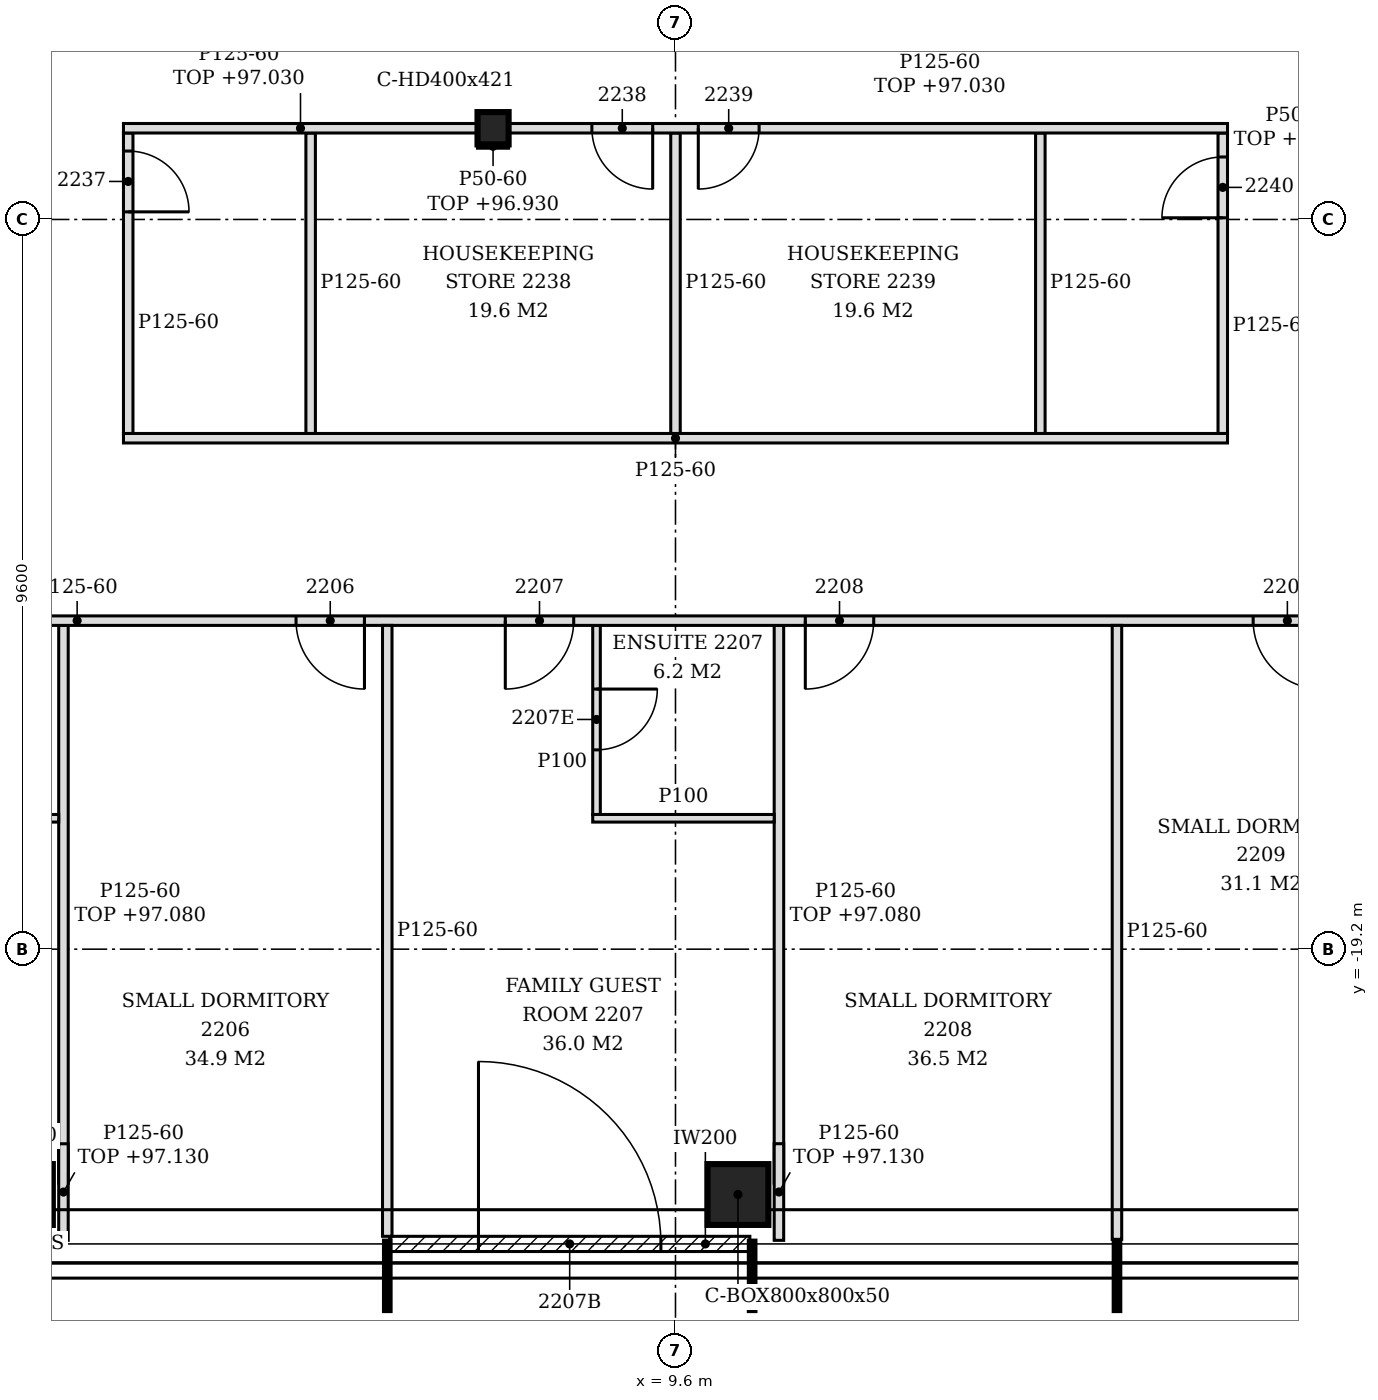
"""IFC4 building model, lengths in metres.
Left out: names, types, materials, properties, quantities, classifications, styles, units other than length and angle.
Written with IfcOpenShell. Run it as: python <this file> out.ifc"""

import sys

from ifc_helpers import new_model, si_unit, direction, frame, frame_2d, origin, origin_2d, place, context, subcontext, project, spatial, polyline, rectangle, hollow_rectangle, i_section, outline, extrude, clip, halfspace, element, fill, save


model = new_model("IFC4")
c1 = context("Model", 3, precision=1e-05, world=origin(), true_north=direction((0.0, 1.0)))
c2 = subcontext(c1, "Body", "Model", "MODEL_VIEW")
j1 = project(units=[si_unit("LENGTHUNIT", "METRE"), si_unit("PLANEANGLEUNIT", "RADIAN")], contexts=[c1])
p1 = place(None, origin())
s1 = spatial("IfcSite", under=j1, at=p1, CompositionType="ELEMENT")
p2 = place(p1, origin())
s2 = spatial("IfcBuilding", under=s1, at=p2, CompositionType="ELEMENT")
p3 = place(p2, frame((0.0, 0.0, 94.2)))
s3 = spatial("IfcBuildingStorey", under=s2, at=p3, CompositionType="ELEMENT", Elevation=94.2)
for number, where, z_axis, x_axis in (
    (1, (1.008, -22.428, -0.15), (0.282, 0.188, 0.941), (-0.555, 0.832, 0.0)),
    (2, (10.422, -22.428, -0.15), (0.282, 0.188, 0.941), (-0.555, 0.832, 0.0)),
):
    element("IfcColumn", number, at=place(p3, frame(where, z_axis=z_axis, x_axis=x_axis)), inside=s3, PredefinedType="COLUMN", context=c2, shape_type="Clipping", body=[
        clip(clip(extrude(hollow_rectangle(XDim=0.8, YDim=0.8, WallThickness=0.05, at=origin_2d()), origin(), (0.0, 0.0, 1.0), 3.826), halfspace(frame((0.0, 0.0, 0.024), z_axis=(0.0, 0.0, 1.0), x_axis=(1.0, 0.0, 0.0)), True)), halfspace(frame((0.0, 0.0, 3.802), z_axis=(0.0, 0.0, 1.0), x_axis=(1.0, 0.0, 0.0)), False)),
    ])
p4 = place(p3, frame((7.2, -8.4, -0.15), z_axis=(0.0, 0.0, 1.0), x_axis=(1.0, 0.0, 0.0)))
e3 = element("IfcColumn", 3, at=p4, inside=s3, PredefinedType="COLUMN", context=c2, shape_type="SweptSolid", body=[
    extrude(i_section(OverallWidth=0.409, OverallDepth=0.425, WebThickness=0.033, FlangeThickness=0.052, FilletRadius=0.015, at=origin_2d()), origin(), (0.0, 0.0, 1.0), 3.6),
])
p5 = place(p3, frame((5.838, -23.078, 0.0), z_axis=(0.0, 0.0, 1.0), x_axis=(1.0, 0.0, 0.0)))
e4 = element("IfcWall", 4, at=p5, inside=s3, PredefinedType="NOTDEFINED", context=c2, shape_type="SweptSolid", body=[
    extrude(rectangle(XDim=4.74, YDim=0.2, at=frame_2d((2.37, 0.0))), origin(), (0.0, 0.0, 1.0), 3.45),
])
p6 = place(p5, frame((1.17, 0.0, 0.0)))
e5 = element("IfcOpeningElement", 5, at=p6, cuts=e4, PredefinedType="OPENING", context=c2, shape_type="SweptSolid", body=[
    extrude(rectangle(XDim=2.4, YDim=2.4, at=frame_2d((1.2, 1.2))), frame((0.0, 0.11, 0.0), z_axis=(0.0, -1.0, 0.0), x_axis=(1.0, 0.0, 0.0)), (0.0, 0.0, 1.0), 0.22),
])
p7 = place(p3, frame((1.548, -23.031, 0.0), z_axis=(0.0, 0.0, 1.0), x_axis=(0.0, 1.0, 0.0)))
e6 = element("IfcWall", 6, at=p7, inside=s3, PredefinedType="PARTITIONING", context=c2, shape_type="SweptSolid", body=[
    extrude(outline(polyline([(0.0, 0.0), (0.44, 0.0), (0.44, 0.863), (0.44, 1.725), (0.711, 2.588), (0.933, 2.93), (0.0, 2.93), (0.0, 2.588), (0.0, 1.725), (0.0, 0.863), (0.0, 0.0)])), frame((0.0, 0.062, 0.0), z_axis=(0.0, -1.0, 0.0), x_axis=(1.0, 0.0, 0.0)), (0.0, 0.0, 1.0), 0.125),
])
p8 = place(p3, frame((5.808, -22.978, 0.0), z_axis=(0.0, 0.0, 1.0), x_axis=(0.0, 1.0, 0.0)))
e7 = element("IfcWall", 7, at=p8, inside=s3, PredefinedType="PARTITIONING", context=c2, shape_type="SweptSolid", body=[
    extrude(outline(polyline([(0.0, 0.0), (8.037, 0.0), (8.037, 3.45), (5.274, 3.45), (5.272, 2.88), (5.064, 2.88), (5.062, 3.45), (1.419, 3.45), (1.417, 2.93), (1.119, 2.93), (1.117, 3.45), (0.0, 3.45), (0.0, 0.0)])), frame((0.0, 0.062, 0.0), z_axis=(0.0, -1.0, 0.0), x_axis=(1.0, 0.0, 0.0)), (0.0, 0.0, 1.0), 0.125),
])
p9 = place(p3, frame((10.961, -23.031, 0.0), z_axis=(0.0, 0.0, 1.0), x_axis=(0.0, 1.0, 0.0)))
e8 = element("IfcWall", 8, at=p9, inside=s3, PredefinedType="PARTITIONING", context=c2, shape_type="SweptSolid", body=[
    extrude(outline(polyline([(0.0, 0.0), (0.44, 0.0), (0.44, 0.863), (0.44, 1.725), (0.711, 2.588), (0.934, 2.93), (0.0, 2.93), (0.0, 2.588), (0.0, 1.725), (0.0, 0.863), (0.0, 0.0)])), frame((0.0, 0.062, 0.0), z_axis=(0.0, -1.0, 0.0), x_axis=(1.0, 0.0, 0.0)), (0.0, 0.0, 1.0), 0.125),
])
p10 = place(p3, frame((15.408, -23.018, 0.0), z_axis=(0.0, 0.0, 1.0), x_axis=(0.0, 1.0, 0.0)))
e9 = element("IfcWall", 9, at=p10, inside=s3, PredefinedType="PARTITIONING", context=c2, shape_type="SweptSolid", body=[
    extrude(outline(polyline([(0.0, 0.0), (8.077, 0.0), (8.077, 3.45), (5.314, 3.45), (5.312, 2.88), (5.104, 2.88), (5.102, 3.45), (1.459, 3.45), (1.457, 2.93), (1.159, 2.93), (1.157, 3.45), (0.0, 3.45), (0.0, 0.0)])), frame((0.0, 0.062, 0.0), z_axis=(0.0, -1.0, 0.0), x_axis=(1.0, 0.0, 0.0)), (0.0, 0.0, 1.0), 0.125),
])
p11 = place(p3, frame((1.548, -22.28, 0.0), z_axis=(0.0, 0.0, 1.0), x_axis=(0.0, 1.0, 0.0)))
e10 = element("IfcWall", 10, at=p11, inside=s3, PredefinedType="PARTITIONING", context=c2, shape_type="SweptSolid", body=[
    extrude(outline(polyline([(0.0, 0.0), (7.339, 0.0), (7.339, 0.863), (7.339, 1.725), (7.339, 2.588), (7.339, 2.88), (0.734, 2.88), (0.734, 2.588), (0.734, 1.725), (0.56, 0.863), (0.0, 0.0)])), frame((0.0, 0.062, 0.0), z_axis=(0.0, -1.0, 0.0), x_axis=(1.0, 0.0, 0.0)), (0.0, 0.0, 1.0), 0.125),
])
p12 = place(p3, frame((10.961, -22.279, 0.0), z_axis=(0.0, 0.0, 1.0), x_axis=(0.0, 1.0, 0.0)))
e11 = element("IfcWall", 11, at=p12, inside=s3, PredefinedType="PARTITIONING", context=c2, shape_type="SweptSolid", body=[
    extrude(outline(polyline([(0.0, 0.0), (7.338, 0.0), (7.338, 0.863), (7.338, 1.725), (7.338, 2.588), (7.338, 2.88), (0.733, 2.88), (0.733, 2.588), (0.733, 1.725), (0.56, 0.863), (0.0, 0.0)])), frame((0.0, 0.062, 0.0), z_axis=(0.0, -1.0, 0.0), x_axis=(1.0, 0.0, 0.0)), (0.0, 0.0, 1.0), 0.125),
])
p13 = place(p3, frame((-0.902, -17.478, 0.0), z_axis=(0.0, 0.0, 1.0), x_axis=(1.0, 0.0, 0.0)))
e12 = element("IfcWall", 12, at=p13, inside=s3, PredefinedType="PARTITIONING", context=c2, shape_type="SweptSolid", body=[
    extrude(rectangle(XDim=2.388, YDim=0.1, at=frame_2d((1.194, 0.0))), origin(), (0.0, 0.0, 1.0), 3.45),
])
p14 = place(p3, frame((8.511, -17.478, 0.0), z_axis=(0.0, 0.0, 1.0), x_axis=(1.0, 0.0, 0.0)))
e13 = element("IfcWall", 13, at=p14, inside=s3, PredefinedType="PARTITIONING", context=c2, shape_type="SweptSolid", body=[
    extrude(rectangle(XDim=2.387, YDim=0.1, at=frame_2d((1.194, 0.0))), origin(), (0.0, 0.0, 1.0), 3.45),
])
p15 = place(p3, frame((8.561, -17.428, 0.0), z_axis=(0.0, 0.0, 1.0), x_axis=(0.0, 1.0, 0.0)))
e14 = element("IfcWall", 14, at=p15, inside=s3, PredefinedType="PARTITIONING", context=c2, shape_type="SweptSolid", body=[
    extrude(rectangle(XDim=2.488, YDim=0.1, at=frame_2d((1.244, 0.0))), origin(), (0.0, 0.0, 1.0), 3.45),
])
p16 = place(p15, frame((0.85, 0.0, 0.0)))
e15 = element("IfcOpeningElement", 15, at=p16, cuts=e14, PredefinedType="OPENING", context=c2, shape_type="SweptSolid", body=[
    extrude(rectangle(XDim=0.8, YDim=2.1, at=frame_2d((0.4, 1.05))), frame((0.0, 0.06, 0.0), z_axis=(0.0, -1.0, 0.0), x_axis=(1.0, 0.0, 0.0)), (0.0, 0.0, 1.0), 0.12),
])
p17 = place(p3, frame((-19.342, -14.878, 0.0), z_axis=(0.0, 0.0, 1.0), x_axis=(1.0, 0.0, 0.0)))
e16 = element("IfcWall", 16, at=p17, inside=s3, PredefinedType="PARTITIONING", context=c2, shape_type="SweptSolid", body=[
    extrude(outline(polyline([(0.0, 0.0), (38.479, 0.0), (38.479, 2.73), (38.392, 2.73), (38.39, 3.45), (26.692, 3.45), (26.69, 2.73), (26.392, 2.73), (26.39, 3.45), (14.692, 3.45), (14.69, 2.73), (14.392, 2.73), (14.39, 3.45), (5.092, 3.45), (5.09, 2.93), (4.792, 2.93), (4.79, 3.45), (0.0, 3.45), (0.0, 0.0)])), frame((0.0, 0.062, 0.0), z_axis=(0.0, -1.0, 0.0), x_axis=(1.0, 0.0, 0.0)), (0.0, 0.0, 1.0), 0.125),
])
p18 = place(p17, frame((0.863, 0.0, 0.0)))
e17 = element("IfcOpeningElement", 17, at=p18, cuts=e16, PredefinedType="OPENING", context=c2, shape_type="SweptSolid", body=[
    extrude(rectangle(XDim=0.9, YDim=2.1, at=frame_2d((0.45, 1.05))), frame((0.0, 0.073, 0.0), z_axis=(0.0, -1.0, 0.0), x_axis=(1.0, 0.0, 0.0)), (0.0, 0.0, 1.0), 0.145),
])
p19 = place(p17, frame((3.742, 0.0, 0.0)))
e18 = element("IfcOpeningElement", 18, at=p19, cuts=e16, PredefinedType="OPENING", context=c2, shape_type="SweptSolid", body=[
    extrude(rectangle(XDim=0.9, YDim=2.1, at=frame_2d((0.45, 1.05))), frame((0.0, 0.073, 0.0), z_axis=(0.0, -1.0, 0.0), x_axis=(1.0, 0.0, 0.0)), (0.0, 0.0, 1.0), 0.145),
])
p20 = place(p17, frame((7.876, 0.0, 0.0)))
e19 = element("IfcOpeningElement", 19, at=p20, cuts=e16, PredefinedType="OPENING", context=c2, shape_type="SweptSolid", body=[
    extrude(rectangle(XDim=0.9, YDim=2.1, at=frame_2d((0.45, 1.05))), frame((0.0, 0.073, 0.0), z_axis=(0.0, -1.0, 0.0), x_axis=(1.0, 0.0, 0.0)), (0.0, 0.0, 1.0), 0.145),
])
p21 = place(p17, frame((14.35, 0.0, 0.0)))
e20 = element("IfcOpeningElement", 20, at=p21, cuts=e16, PredefinedType="OPENING", context=c2, shape_type="SweptSolid", body=[
    extrude(rectangle(XDim=0.9, YDim=2.1, at=frame_2d((0.45, 1.05))), frame((0.0, 0.073, 0.0), z_axis=(0.0, -1.0, 0.0), x_axis=(1.0, 0.0, 0.0)), (0.0, 0.0, 1.0), 0.145),
])
p22 = place(p17, frame((17.29, 0.0, 0.0)))
e21 = element("IfcOpeningElement", 21, at=p22, cuts=e16, PredefinedType="OPENING", context=c2, shape_type="SweptSolid", body=[
    extrude(rectangle(XDim=0.9, YDim=2.1, at=frame_2d((0.45, 1.05))), frame((0.0, 0.073, 0.0), z_axis=(0.0, -1.0, 0.0), x_axis=(1.0, 0.0, 0.0)), (0.0, 0.0, 1.0), 0.145),
])
p23 = place(p17, frame((23.95, 0.0, 0.0)))
e22 = element("IfcOpeningElement", 22, at=p23, cuts=e16, PredefinedType="OPENING", context=c2, shape_type="SweptSolid", body=[
    extrude(rectangle(XDim=0.9, YDim=2.1, at=frame_2d((0.45, 1.05))), frame((0.0, 0.073, 0.0), z_axis=(0.0, -1.0, 0.0), x_axis=(1.0, 0.0, 0.0)), (0.0, 0.0, 1.0), 0.145),
])
p24 = place(p17, frame((26.703, 0.0, 0.0)))
e23 = element("IfcOpeningElement", 23, at=p24, cuts=e16, PredefinedType="OPENING", context=c2, shape_type="SweptSolid", body=[
    extrude(rectangle(XDim=0.9, YDim=2.1, at=frame_2d((0.45, 1.05))), frame((0.0, 0.073, 0.0), z_axis=(0.0, -1.0, 0.0), x_axis=(1.0, 0.0, 0.0)), (0.0, 0.0, 1.0), 0.145),
])
p25 = place(p17, frame((30.65, 0.0, 0.0)))
e24 = element("IfcOpeningElement", 24, at=p25, cuts=e16, PredefinedType="OPENING", context=c2, shape_type="SweptSolid", body=[
    extrude(rectangle(XDim=0.9, YDim=2.1, at=frame_2d((0.45, 1.05))), frame((0.0, 0.073, 0.0), z_axis=(0.0, -1.0, 0.0), x_axis=(1.0, 0.0, 0.0)), (0.0, 0.0, 1.0), 0.145),
])
p26 = place(p17, frame((36.542, 0.0, 0.0)))
e25 = element("IfcOpeningElement", 25, at=p26, cuts=e16, PredefinedType="OPENING", context=c2, shape_type="SweptSolid", body=[
    extrude(rectangle(XDim=0.9, YDim=2.1, at=frame_2d((0.45, 1.05))), frame((0.0, 0.073, 0.0), z_axis=(0.0, -1.0, 0.0), x_axis=(1.0, 0.0, 0.0)), (0.0, 0.0, 1.0), 0.145),
])
p27 = place(p3, frame((2.337, -12.478, 0.0), z_axis=(0.0, 0.0, 1.0), x_axis=(1.0, 0.0, 0.0)))
e26 = element("IfcWall", 26, at=p27, inside=s3, PredefinedType="PARTITIONING", context=c2, shape_type="SweptSolid", body=[
    extrude(outline(polyline([(0.0, 0.0), (14.525, 0.0), (14.525, 3.45), (5.012, 3.45), (5.01, 2.73), (4.712, 2.73), (4.71, 3.45), (0.0, 3.45), (0.0, 0.0)])), frame((0.0, 0.062, 0.0), z_axis=(0.0, -1.0, 0.0), x_axis=(1.0, 0.0, 0.0)), (0.0, 0.0, 1.0), 0.125),
])
p28 = place(p3, frame((2.4, -12.416, 0.0), z_axis=(0.0, 0.0, 1.0), x_axis=(0.0, 1.0, 0.0)))
e27 = element("IfcWall", 27, at=p28, inside=s3, PredefinedType="PARTITIONING", context=c2, shape_type="SweptSolid", body=[
    extrude(outline(polyline([(0.0, 0.0), (3.953, 0.0), (3.953, 2.83), (3.865, 2.83), (3.864, 3.45), (0.0, 3.45), (0.0, 0.0)])), frame((0.0, 0.062, 0.0), z_axis=(0.0, -1.0, 0.0), x_axis=(1.0, 0.0, 0.0)), (0.0, 0.0, 1.0), 0.125),
])
p29 = place(p28, frame((2.916, 0.0, 0.0)))
e28 = element("IfcOpeningElement", 28, at=p29, cuts=e27, PredefinedType="OPENING", context=c2, shape_type="SweptSolid", body=[
    extrude(rectangle(XDim=0.8, YDim=2.1, at=frame_2d((0.4, 1.05))), frame((0.0, 0.073, 0.0), z_axis=(0.0, -1.0, 0.0), x_axis=(1.0, 0.0, 0.0)), (0.0, 0.0, 1.0), 0.145),
])
for number, where, z_axis, x_axis in (
    (29, (4.8, -12.416, 0.0), (0.0, 0.0, 1.0), (0.0, 1.0, 0.0)),
    (30, (9.6, -12.416, 0.0), (0.0, 0.0, 1.0), (0.0, 1.0, 0.0)),
    (31, (14.4, -12.416, 0.0), (0.0, 0.0, 1.0), (0.0, 1.0, 0.0)),
):
    element("IfcWall", number, at=place(p3, frame(where, z_axis=z_axis, x_axis=x_axis)), inside=s3, PredefinedType="PARTITIONING", context=c2, shape_type="SweptSolid", body=[
        extrude(outline(polyline([(0.0, 0.0), (3.953, 0.0), (3.953, 2.83), (3.865, 2.83), (3.864, 3.45), (0.0, 3.45), (0.0, 0.0)])), frame((0.0, 0.062, 0.0), z_axis=(0.0, -1.0, 0.0), x_axis=(1.0, 0.0, 0.0)), (0.0, 0.0, 1.0), 0.125),
    ])
p30 = place(p3, frame((16.8, -12.416, 0.0), z_axis=(0.0, 0.0, 1.0), x_axis=(0.0, 1.0, 0.0)))
e32 = element("IfcWall", 32, at=p30, inside=s3, PredefinedType="PARTITIONING", context=c2, shape_type="SweptSolid", body=[
    extrude(outline(polyline([(0.0, 0.0), (3.953, 0.0), (3.953, 2.83), (3.865, 2.83), (3.864, 3.45), (0.0, 3.45), (0.0, 0.0)])), frame((0.0, 0.062, 0.0), z_axis=(0.0, -1.0, 0.0), x_axis=(1.0, 0.0, 0.0)), (0.0, 0.0, 1.0), 0.125),
])
p31 = place(p30, frame((2.837, 0.0, 0.0)))
e33 = element("IfcOpeningElement", 33, at=p31, cuts=e32, PredefinedType="OPENING", context=c2, shape_type="SweptSolid", body=[
    extrude(rectangle(XDim=0.8, YDim=2.1, at=frame_2d((0.4, 1.05))), frame((0.0, 0.073, 0.0), z_axis=(0.0, -1.0, 0.0), x_axis=(1.0, 0.0, 0.0)), (0.0, 0.0, 1.0), 0.145),
])
p32 = place(p3, frame((2.337, -8.4, 0.0), z_axis=(0.0, 0.0, 1.0), x_axis=(1.0, 0.0, 0.0)))
e34 = element("IfcWall", 34, at=p32, inside=s3, PredefinedType="PARTITIONING", context=c2, shape_type="SweptSolid", body=[
    extrude(rectangle(XDim=4.658, YDim=0.125, at=frame_2d((2.329, 0.0))), origin(), (0.0, 0.0, 1.0), 2.83),
])
p33 = place(p3, frame((7.405, -8.4, 0.0), z_axis=(0.0, 0.0, 1.0), x_axis=(1.0, 0.0, 0.0)))
e35 = element("IfcWall", 35, at=p33, inside=s3, PredefinedType="PARTITIONING", context=c2, shape_type="SweptSolid", body=[
    extrude(rectangle(XDim=9.458, YDim=0.125, at=frame_2d((4.729, 0.0))), origin(), (0.0, 0.0, 1.0), 2.83),
])
p34 = place(p33, frame((1.095, 0.0, 0.0)))
e36 = element("IfcOpeningElement", 36, at=p34, cuts=e35, PredefinedType="OPENING", context=c2, shape_type="SweptSolid", body=[
    extrude(rectangle(XDim=0.8, YDim=2.1, at=frame_2d((0.4, 1.05))), frame((0.0, 0.073, 0.0), z_axis=(0.0, -1.0, 0.0), x_axis=(1.0, 0.0, 0.0)), (0.0, 0.0, 1.0), 0.145),
])
p35 = place(p33, frame((2.496, 0.0, 0.0)))
e37 = element("IfcOpeningElement", 37, at=p35, cuts=e35, PredefinedType="OPENING", context=c2, shape_type="SweptSolid", body=[
    extrude(rectangle(XDim=0.8, YDim=2.1, at=frame_2d((0.4, 1.05))), frame((0.0, 0.073, 0.0), z_axis=(0.0, -1.0, 0.0), x_axis=(1.0, 0.0, 0.0)), (0.0, 0.0, 1.0), 0.145),
])
p36 = place(p3, frame((6.996, -8.637, 0.0), z_axis=(0.0, 0.0, 1.0), x_axis=(1.0, 0.0, 0.0)))
e38 = element("IfcWall", 38, at=p36, inside=s3, PredefinedType="PARTITIONING", context=c2, shape_type="SweptSolid", body=[
    extrude(rectangle(XDim=0.409, YDim=0.05, at=frame_2d((0.205, 0.0))), origin(), (0.0, 0.0, 1.0), 2.73),
])
p37 = place(p6, origin())
e39 = element("IfcDoor", 39, at=p37, inside=s3, OperationType="SINGLE_SWING_LEFT", PredefinedType="DOOR", context=c2, shape_type="SweptSolid", body=[
    extrude(rectangle(XDim=2.4, YDim=2.4, at=frame_2d((1.2, 1.2))), frame((0.0, 0.025, 0.0), z_axis=(0.0, -1.0, 0.0), x_axis=(1.0, 0.0, 0.0)), (0.0, 0.0, 1.0), 0.05),
])
fill(e5, e39)
p38 = place(p23, frame((0.9, 0.0, 0.0), z_axis=(0.0, 0.0, 1.0), x_axis=(-1.0, 0.0, 0.0)))
e40 = element("IfcDoor", 40, at=p38, inside=s3, OperationType="SINGLE_SWING_LEFT", PredefinedType="DOOR", context=c2, shape_type="SweptSolid", body=[
    extrude(rectangle(XDim=0.9, YDim=2.1, at=frame_2d((0.45, 1.05))), frame((0.0, 0.025, 0.0), z_axis=(0.0, -1.0, 0.0), x_axis=(1.0, 0.0, 0.0)), (0.0, 0.0, 1.0), 0.05),
])
fill(e22, e40)
p39 = place(p24, frame((0.9, 0.0, 0.0), z_axis=(0.0, 0.0, 1.0), x_axis=(-1.0, 0.0, 0.0)))
e41 = element("IfcDoor", 41, at=p39, inside=s3, OperationType="SINGLE_SWING_RIGHT", PredefinedType="DOOR", context=c2, shape_type="SweptSolid", body=[
    extrude(rectangle(XDim=0.9, YDim=2.1, at=frame_2d((0.45, 1.05))), frame((0.0, 0.025, 0.0), z_axis=(0.0, -1.0, 0.0), x_axis=(1.0, 0.0, 0.0)), (0.0, 0.0, 1.0), 0.05),
])
fill(e23, e41)
p40 = place(p16, frame((0.8, 0.0, 0.0), z_axis=(0.0, 0.0, 1.0), x_axis=(-1.0, 0.0, 0.0)))
e42 = element("IfcDoor", 42, at=p40, inside=s3, OperationType="SINGLE_SWING_LEFT", PredefinedType="DOOR", context=c2, shape_type="SweptSolid", body=[
    extrude(rectangle(XDim=0.8, YDim=2.1, at=frame_2d((0.4, 1.05))), frame((0.0, 0.025, 0.0), z_axis=(0.0, -1.0, 0.0), x_axis=(1.0, 0.0, 0.0)), (0.0, 0.0, 1.0), 0.05),
])
fill(e15, e42)
p41 = place(p25, frame((0.9, 0.0, 0.0), z_axis=(0.0, 0.0, 1.0), x_axis=(-1.0, 0.0, 0.0)))
e43 = element("IfcDoor", 43, at=p41, inside=s3, OperationType="SINGLE_SWING_RIGHT", PredefinedType="DOOR", context=c2, shape_type="SweptSolid", body=[
    extrude(rectangle(XDim=0.9, YDim=2.1, at=frame_2d((0.45, 1.05))), frame((0.0, 0.025, 0.0), z_axis=(0.0, -1.0, 0.0), x_axis=(1.0, 0.0, 0.0)), (0.0, 0.0, 1.0), 0.05),
])
fill(e24, e43)
p42 = place(p26, frame((0.9, 0.0, 0.0), z_axis=(0.0, 0.0, 1.0), x_axis=(-1.0, 0.0, 0.0)))
e44 = element("IfcDoor", 44, at=p42, inside=s3, OperationType="SINGLE_SWING_LEFT", PredefinedType="DOOR", context=c2, shape_type="SweptSolid", body=[
    extrude(rectangle(XDim=0.9, YDim=2.1, at=frame_2d((0.45, 1.05))), frame((0.0, 0.025, 0.0), z_axis=(0.0, -1.0, 0.0), x_axis=(1.0, 0.0, 0.0)), (0.0, 0.0, 1.0), 0.05),
])
fill(e25, e44)
p43 = place(p29, frame((0.8, 0.0, 0.0), z_axis=(0.0, 0.0, 1.0), x_axis=(-1.0, 0.0, 0.0)))
e45 = element("IfcDoor", 45, at=p43, inside=s3, OperationType="SINGLE_SWING_RIGHT", PredefinedType="DOOR", context=c2, shape_type="SweptSolid", body=[
    extrude(rectangle(XDim=0.8, YDim=2.1, at=frame_2d((0.4, 1.05))), frame((0.0, 0.025, 0.0), z_axis=(0.0, -1.0, 0.0), x_axis=(1.0, 0.0, 0.0)), (0.0, 0.0, 1.0), 0.05),
])
fill(e28, e45)
p44 = place(p34, frame((0.8, 0.0, 0.0), z_axis=(0.0, 0.0, 1.0), x_axis=(-1.0, 0.0, 0.0)))
e46 = element("IfcDoor", 46, at=p44, inside=s3, OperationType="SINGLE_SWING_LEFT", PredefinedType="DOOR", context=c2, shape_type="SweptSolid", body=[
    extrude(rectangle(XDim=0.8, YDim=2.1, at=frame_2d((0.4, 1.05))), frame((0.0, 0.025, 0.0), z_axis=(0.0, -1.0, 0.0), x_axis=(1.0, 0.0, 0.0)), (0.0, 0.0, 1.0), 0.05),
])
fill(e36, e46)
p45 = place(p35, frame((0.8, 0.0, 0.0), z_axis=(0.0, 0.0, 1.0), x_axis=(-1.0, 0.0, 0.0)))
e47 = element("IfcDoor", 47, at=p45, inside=s3, OperationType="SINGLE_SWING_RIGHT", PredefinedType="DOOR", context=c2, shape_type="SweptSolid", body=[
    extrude(rectangle(XDim=0.8, YDim=2.1, at=frame_2d((0.4, 1.05))), frame((0.0, 0.025, 0.0), z_axis=(0.0, -1.0, 0.0), x_axis=(1.0, 0.0, 0.0)), (0.0, 0.0, 1.0), 0.05),
])
fill(e37, e47)
p46 = place(p31, origin())
e48 = element("IfcDoor", 48, at=p46, inside=s3, OperationType="SINGLE_SWING_LEFT", PredefinedType="DOOR", context=c2, shape_type="SweptSolid", body=[
    extrude(rectangle(XDim=0.8, YDim=2.1, at=frame_2d((0.4, 1.05))), frame((0.0, 0.025, 0.0), z_axis=(0.0, -1.0, 0.0), x_axis=(1.0, 0.0, 0.0)), (0.0, 0.0, 1.0), 0.05),
])
fill(e33, e48)
save(model, sys.argv[1])
